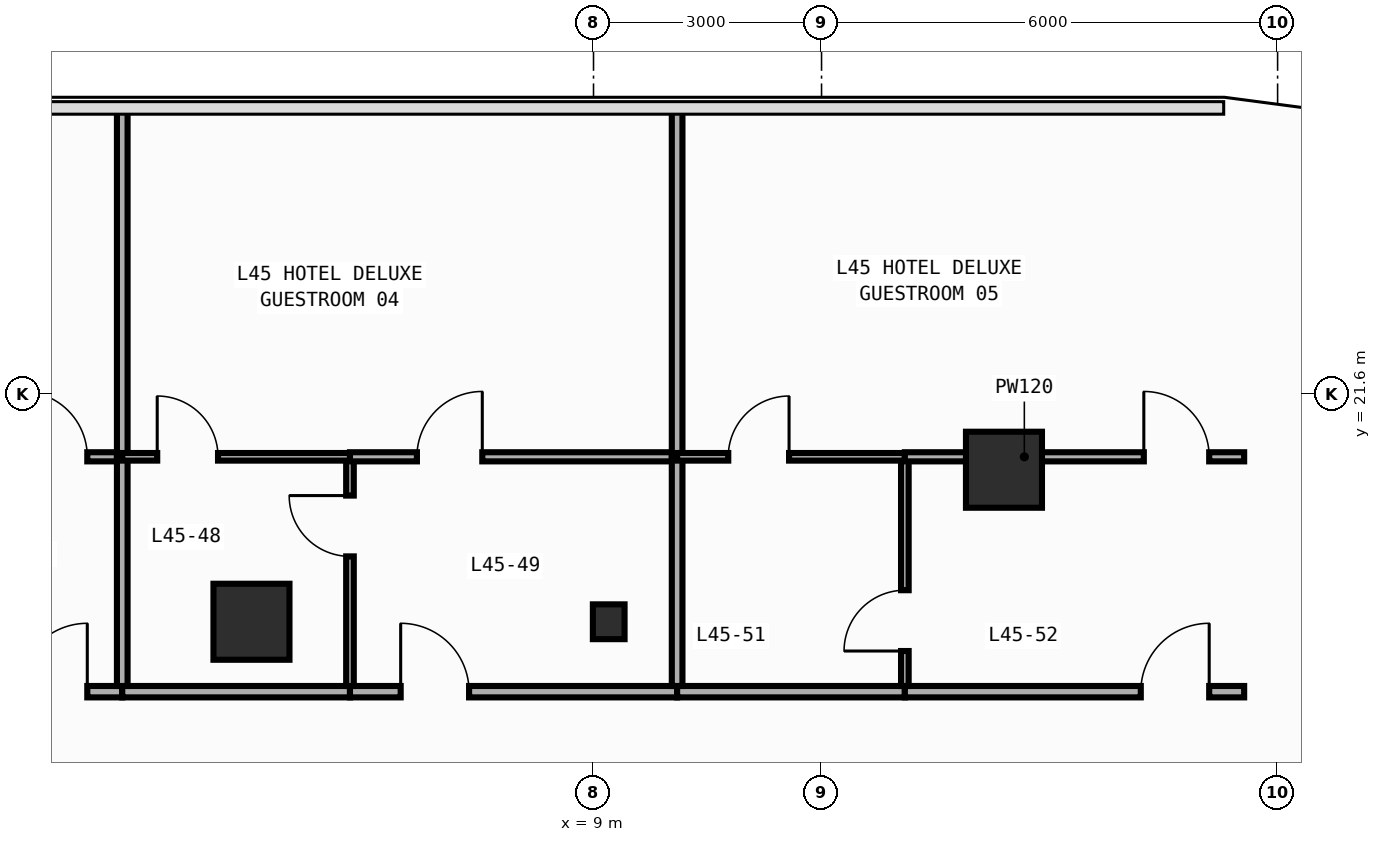
"""IFC4 building model, lengths in metres.
Left out: names, types, materials, properties, quantities, classifications, styles, units other than length and angle.
Written with IfcOpenShell. Run it as: python <this file> out.ifc"""

import sys

from ifc_helpers import new_model, si_unit, direction, frame, frame_2d, origin, origin_2d, place, context, subcontext, project, spatial, rectangle, i_section, extrude, element, fill, save


model = new_model("IFC4")
c1 = context("Model", 3, precision=1e-05, world=origin(), true_north=direction((0.0, 1.0)))
c2 = subcontext(c1, "Body", "Model", "MODEL_VIEW")
j1 = project(units=[si_unit("LENGTHUNIT", "METRE"), si_unit("PLANEANGLEUNIT", "RADIAN")], contexts=[c1])
p1 = place(None, origin())
s1 = spatial("IfcSite", under=j1, at=p1, CompositionType="ELEMENT")
p2 = place(p1, origin())
s2 = spatial("IfcBuilding", under=s1, at=p2, CompositionType="ELEMENT")
p3 = place(p2, frame((0.0, 0.0, 195.4)))
s3 = spatial("IfcBuildingStorey", under=s2, at=p3, CompositionType="ELEMENT", Elevation=195.4)
p4 = place(p3, frame((9.2, 18.6, 0.0), z_axis=(0.0, 0.0, 1.0), x_axis=(1.0, 0.0, 0.0)))
e1 = element("IfcColumn", 1, at=p4, inside=s3, PredefinedType="COLUMN", context=c2, shape_type="SweptSolid", body=[
    extrude(i_section(OverallWidth=0.417, OverallDepth=0.458, WebThickness=0.03, FlangeThickness=0.05, FilletRadius=0.022, at=origin_2d()), origin(), (0.0, 0.0, 1.0), 3.8),
])
for number, where, z_axis, x_axis in (
    (2, (4.5, 18.6, 0.0), (0.0, 0.0, 1.0), (1.0, 0.0, 0.0)),
    (3, (14.4, 20.6, 0.0), (0.0, 0.0, 1.0), (1.0, 0.0, 0.0)),
):
    element("IfcColumn", number, at=place(p3, frame(where, z_axis=z_axis, x_axis=x_axis)), inside=s3, PredefinedType="COLUMN", context=c2, shape_type="SweptSolid", body=[
        extrude(rectangle(XDim=1.0, YDim=1.0, at=origin_2d()), origin(), (0.0, 0.0, 1.0), 3.8),
    ])
p5 = place(p3, frame((-1.444, 17.68, 0.0), z_axis=(0.0, 0.0, 1.0), x_axis=(1.0, 0.0, 0.0)))
e4 = element("IfcWall", 4, at=p5, inside=s3, PredefinedType="PARTITIONING", context=c2, shape_type="SweptSolid", body=[
    extrude(rectangle(XDim=4.244, YDim=0.15, at=frame_2d((2.122, 0.0))), origin(), (0.0, 0.0, 1.0), 3.54),
])
p6 = place(p5, frame((2.884, 0.0, 0.0)))
e5 = element("IfcOpeningElement", 5, at=p6, cuts=e4, PredefinedType="OPENING", context=c2, shape_type="SweptSolid", body=[
    extrude(rectangle(XDim=0.9, YDim=2.15, at=frame_2d((0.45, 1.075))), frame((0.0, 0.085, 0.0), z_axis=(0.0, -1.0, 0.0), x_axis=(1.0, 0.0, 0.0)), (0.0, 0.0, 1.0), 0.17),
])
p7 = place(p3, frame((2.8, 17.68, 0.0), z_axis=(0.0, 0.0, 1.0), x_axis=(1.0, 0.0, 0.0)))
e6 = element("IfcWall", 6, at=p7, inside=s3, PredefinedType="PARTITIONING", context=c2, shape_type="SweptSolid", body=[
    extrude(rectangle(XDim=2.996, YDim=0.15, at=frame_2d((1.498, 0.0))), origin(), (0.0, 0.0, 1.0), 3.54),
])
p8 = place(p3, frame((5.796, 17.68, 0.0), z_axis=(0.0, 0.0, 1.0), x_axis=(1.0, 0.0, 0.0)))
e7 = element("IfcWall", 7, at=p8, inside=s3, PredefinedType="PARTITIONING", context=c2, shape_type="SweptSolid", body=[
    extrude(rectangle(XDim=4.304, YDim=0.15, at=frame_2d((2.152, 0.0))), origin(), (0.0, 0.0, 1.0), 3.54),
])
p9 = place(p8, frame((0.667, 0.0, 0.0)))
e8 = element("IfcOpeningElement", 8, at=p9, cuts=e7, PredefinedType="OPENING", context=c2, shape_type="SweptSolid", body=[
    extrude(rectangle(XDim=0.9, YDim=2.15, at=frame_2d((0.45, 1.075))), frame((0.0, 0.085, 0.0), z_axis=(0.0, -1.0, 0.0), x_axis=(1.0, 0.0, 0.0)), (0.0, 0.0, 1.0), 0.17),
])
p10 = place(p3, frame((10.1, 17.68, 0.0), z_axis=(0.0, 0.0, 1.0), x_axis=(1.0, 0.0, 0.0)))
e9 = element("IfcWall", 9, at=p10, inside=s3, PredefinedType="PARTITIONING", context=c2, shape_type="SweptSolid", body=[
    extrude(rectangle(XDim=2.996, YDim=0.15, at=frame_2d((1.498, 0.0))), origin(), (0.0, 0.0, 1.0), 3.54),
])
p11 = place(p3, frame((13.096, 17.68, 0.0), z_axis=(0.0, 0.0, 1.0), x_axis=(1.0, 0.0, 0.0)))
e10 = element("IfcWall", 10, at=p11, inside=s3, PredefinedType="PARTITIONING", context=c2, shape_type="SweptSolid", body=[
    extrude(rectangle(XDim=4.464, YDim=0.15, at=frame_2d((2.232, 0.0))), origin(), (0.0, 0.0, 1.0), 3.54),
])
p12 = place(p11, frame((3.104, 0.0, 0.0)))
e11 = element("IfcOpeningElement", 11, at=p12, cuts=e10, PredefinedType="OPENING", context=c2, shape_type="SweptSolid", body=[
    extrude(rectangle(XDim=0.9, YDim=2.15, at=frame_2d((0.45, 1.075))), frame((0.0, 0.085, 0.0), z_axis=(0.0, -1.0, 0.0), x_axis=(1.0, 0.0, 0.0)), (0.0, 0.0, 1.0), 0.17),
])
p13 = place(p3, frame((-1.444, 20.77, 0.0), z_axis=(0.0, 0.0, 1.0), x_axis=(1.0, 0.0, 0.0)))
e12 = element("IfcWall", 12, at=p13, inside=s3, PredefinedType="PARTITIONING", context=c2, shape_type="SweptSolid", body=[
    extrude(rectangle(XDim=4.244, YDim=0.12, at=frame_2d((2.122, 0.0))), origin(), (0.0, 0.0, 1.0), 3.54),
])
p14 = place(p13, frame((2.924, 0.0, 0.0)))
e13 = element("IfcOpeningElement", 13, at=p14, cuts=e12, PredefinedType="OPENING", context=c2, shape_type="SweptSolid", body=[
    extrude(rectangle(XDim=0.86, YDim=2.15, at=frame_2d((0.43, 1.075))), frame((0.0, 0.07, 0.0), z_axis=(0.0, -1.0, 0.0), x_axis=(1.0, 0.0, 0.0)), (0.0, 0.0, 1.0), 0.14),
])
p15 = place(p3, frame((2.8, 17.755, 0.0), z_axis=(0.0, 0.0, 1.0), x_axis=(0.0, 1.0, 0.0)))
e14 = element("IfcWall", 14, at=p15, inside=s3, PredefinedType="PARTITIONING", context=c2, shape_type="SweptSolid", body=[
    extrude(rectangle(XDim=3.015, YDim=0.14, at=frame_2d((1.508, 0.0))), origin(), (0.0, 0.0, 1.0), 3.54),
])
p16 = place(p3, frame((2.8, 20.77, 0.0), z_axis=(0.0, 0.0, 1.0), x_axis=(0.0, 1.0, 0.0)))
e15 = element("IfcWall", 15, at=p16, inside=s3, PredefinedType="PARTITIONING", context=c2, shape_type="SweptSolid", body=[
    extrude(rectangle(XDim=4.585, YDim=0.14, at=frame_2d((2.292, 0.0))), origin(), (0.0, 0.0, 1.0), 3.54),
])
p17 = place(p3, frame((5.796, 17.755, 0.0), z_axis=(0.0, 0.0, 1.0), x_axis=(0.0, 1.0, 0.0)))
e16 = element("IfcWall", 16, at=p17, inside=s3, PredefinedType="PARTITIONING", context=c2, shape_type="SweptSolid", body=[
    extrude(rectangle(XDim=2.965, YDim=0.1, at=frame_2d((1.482, 0.0))), origin(), (0.0, 0.0, 1.0), 3.54),
])
p18 = place(p17, frame((1.705, 0.0, 0.0)))
e17 = element("IfcOpeningElement", 17, at=p18, cuts=e16, PredefinedType="OPENING", context=c2, shape_type="SweptSolid", body=[
    extrude(rectangle(XDim=0.8, YDim=2.1, at=frame_2d((0.4, 1.05))), frame((0.0, 0.06, 0.0), z_axis=(0.0, -1.0, 0.0), x_axis=(1.0, 0.0, 0.0)), (0.0, 0.0, 1.0), 0.12),
])
p19 = place(p3, frame((2.8, 20.77, 0.0), z_axis=(0.0, 0.0, 1.0), x_axis=(1.0, 0.0, 0.0)))
e18 = element("IfcWall", 18, at=p19, inside=s3, PredefinedType="PARTITIONING", context=c2, shape_type="SweptSolid", body=[
    extrude(rectangle(XDim=2.996, YDim=0.1, at=frame_2d((1.498, 0.0))), origin(), (0.0, 0.0, 1.0), 3.54),
])
p20 = place(p19, frame((0.46, 0.0, 0.0)))
e19 = element("IfcOpeningElement", 19, at=p20, cuts=e18, PredefinedType="OPENING", context=c2, shape_type="SweptSolid", body=[
    extrude(rectangle(XDim=0.8, YDim=2.1, at=frame_2d((0.4, 1.05))), frame((0.0, 0.06, 0.0), z_axis=(0.0, -1.0, 0.0), x_axis=(1.0, 0.0, 0.0)), (0.0, 0.0, 1.0), 0.12),
])
p21 = place(p3, frame((5.796, 20.77, 0.0), z_axis=(0.0, 0.0, 1.0), x_axis=(1.0, 0.0, 0.0)))
e20 = element("IfcWall", 20, at=p21, inside=s3, PredefinedType="PARTITIONING", context=c2, shape_type="SweptSolid", body=[
    extrude(rectangle(XDim=4.304, YDim=0.12, at=frame_2d((2.152, 0.0))), origin(), (0.0, 0.0, 1.0), 3.54),
])
p22 = place(p21, frame((0.881, 0.0, 0.0)))
e21 = element("IfcOpeningElement", 21, at=p22, cuts=e20, PredefinedType="OPENING", context=c2, shape_type="SweptSolid", body=[
    extrude(rectangle(XDim=0.86, YDim=2.15, at=frame_2d((0.43, 1.075))), frame((0.0, 0.07, 0.0), z_axis=(0.0, -1.0, 0.0), x_axis=(1.0, 0.0, 0.0)), (0.0, 0.0, 1.0), 0.14),
])
p23 = place(p3, frame((10.1, 17.755, 0.0), z_axis=(0.0, 0.0, 1.0), x_axis=(0.0, 1.0, 0.0)))
e22 = element("IfcWall", 22, at=p23, inside=s3, PredefinedType="PARTITIONING", context=c2, shape_type="SweptSolid", body=[
    extrude(rectangle(XDim=3.015, YDim=0.14, at=frame_2d((1.508, 0.0))), origin(), (0.0, 0.0, 1.0), 3.54),
])
p24 = place(p3, frame((10.1, 20.77, 0.0), z_axis=(0.0, 0.0, 1.0), x_axis=(0.0, 1.0, 0.0)))
e23 = element("IfcWall", 23, at=p24, inside=s3, PredefinedType="PARTITIONING", context=c2, shape_type="SweptSolid", body=[
    extrude(rectangle(XDim=4.585, YDim=0.14, at=frame_2d((2.292, 0.0))), origin(), (0.0, 0.0, 1.0), 3.54),
])
p25 = place(p3, frame((13.096, 17.755, 0.0), z_axis=(0.0, 0.0, 1.0), x_axis=(0.0, 1.0, 0.0)))
e24 = element("IfcWall", 24, at=p25, inside=s3, PredefinedType="PARTITIONING", context=c2, shape_type="SweptSolid", body=[
    extrude(rectangle(XDim=2.965, YDim=0.1, at=frame_2d((1.482, 0.0))), origin(), (0.0, 0.0, 1.0), 3.54),
])
p26 = place(p25, frame((0.46, 0.0, 0.0)))
e25 = element("IfcOpeningElement", 25, at=p26, cuts=e24, PredefinedType="OPENING", context=c2, shape_type="SweptSolid", body=[
    extrude(rectangle(XDim=0.8, YDim=2.1, at=frame_2d((0.4, 1.05))), frame((0.0, 0.06, 0.0), z_axis=(0.0, -1.0, 0.0), x_axis=(1.0, 0.0, 0.0)), (0.0, 0.0, 1.0), 0.12),
])
p27 = place(p3, frame((10.1, 20.77, 0.0), z_axis=(0.0, 0.0, 1.0), x_axis=(1.0, 0.0, 0.0)))
e26 = element("IfcWall", 26, at=p27, inside=s3, PredefinedType="PARTITIONING", context=c2, shape_type="SweptSolid", body=[
    extrude(rectangle(XDim=2.996, YDim=0.1, at=frame_2d((1.498, 0.0))), origin(), (0.0, 0.0, 1.0), 3.54),
])
p28 = place(p27, frame((0.673, 0.0, 0.0)))
e27 = element("IfcOpeningElement", 27, at=p28, cuts=e26, PredefinedType="OPENING", context=c2, shape_type="SweptSolid", body=[
    extrude(rectangle(XDim=0.8, YDim=2.1, at=frame_2d((0.4, 1.05))), frame((0.0, 0.06, 0.0), z_axis=(0.0, -1.0, 0.0), x_axis=(1.0, 0.0, 0.0)), (0.0, 0.0, 1.0), 0.12),
])
p29 = place(p3, frame((13.096, 20.77, 0.0), z_axis=(0.0, 0.0, 1.0), x_axis=(1.0, 0.0, 0.0)))
e28 = element("IfcWall", 28, at=p29, inside=s3, PredefinedType="PARTITIONING", context=c2, shape_type="SweptSolid", body=[
    extrude(rectangle(XDim=4.464, YDim=0.12, at=frame_2d((2.232, 0.0))), origin(), (0.0, 0.0, 1.0), 3.54),
])
p30 = place(p29, frame((3.144, 0.0, 0.0)))
e29 = element("IfcOpeningElement", 29, at=p30, cuts=e28, PredefinedType="OPENING", context=c2, shape_type="SweptSolid", body=[
    extrude(rectangle(XDim=0.86, YDim=2.15, at=frame_2d((0.43, 1.075))), frame((0.0, 0.07, 0.0), z_axis=(0.0, -1.0, 0.0), x_axis=(1.0, 0.0, 0.0)), (0.0, 0.0, 1.0), 0.14),
])
p31 = place(p6, origin())
e30 = element("IfcDoor", 30, at=p31, inside=s3, OperationType="SINGLE_SWING_RIGHT", PredefinedType="DOOR", context=c2, shape_type="SweptSolid", body=[
    extrude(rectangle(XDim=0.9, YDim=2.15, at=frame_2d((0.45, 1.075))), frame((0.0, 0.025, 0.0), z_axis=(0.0, -1.0, 0.0), x_axis=(1.0, 0.0, 0.0)), (0.0, 0.0, 1.0), 0.05),
])
fill(e5, e30)
p32 = place(p9, origin())
e31 = element("IfcDoor", 31, at=p32, inside=s3, OperationType="SINGLE_SWING_LEFT", PredefinedType="DOOR", context=c2, shape_type="SweptSolid", body=[
    extrude(rectangle(XDim=0.9, YDim=2.15, at=frame_2d((0.45, 1.075))), frame((0.0, 0.025, 0.0), z_axis=(0.0, -1.0, 0.0), x_axis=(1.0, 0.0, 0.0)), (0.0, 0.0, 1.0), 0.05),
])
fill(e8, e31)
p33 = place(p12, origin())
e32 = element("IfcDoor", 32, at=p33, inside=s3, OperationType="SINGLE_SWING_RIGHT", PredefinedType="DOOR", context=c2, shape_type="SweptSolid", body=[
    extrude(rectangle(XDim=0.9, YDim=2.15, at=frame_2d((0.45, 1.075))), frame((0.0, 0.025, 0.0), z_axis=(0.0, -1.0, 0.0), x_axis=(1.0, 0.0, 0.0)), (0.0, 0.0, 1.0), 0.05),
])
fill(e11, e32)
p34 = place(p14, origin())
e33 = element("IfcDoor", 33, at=p34, inside=s3, OperationType="SINGLE_SWING_LEFT", PredefinedType="DOOR", context=c2, shape_type="SweptSolid", body=[
    extrude(rectangle(XDim=0.86, YDim=2.15, at=frame_2d((0.43, 1.075))), frame((0.0, 0.025, 0.0), z_axis=(0.0, -1.0, 0.0), x_axis=(1.0, 0.0, 0.0)), (0.0, 0.0, 1.0), 0.05),
])
fill(e13, e33)
p35 = place(p18, origin())
e34 = element("IfcDoor", 34, at=p35, inside=s3, OperationType="SINGLE_SWING_RIGHT", PredefinedType="DOOR", context=c2, shape_type="SweptSolid", body=[
    extrude(rectangle(XDim=0.8, YDim=2.1, at=frame_2d((0.4, 1.05))), frame((0.0, 0.025, 0.0), z_axis=(0.0, -1.0, 0.0), x_axis=(1.0, 0.0, 0.0)), (0.0, 0.0, 1.0), 0.05),
])
fill(e17, e34)
p36 = place(p20, origin())
e35 = element("IfcDoor", 35, at=p36, inside=s3, OperationType="SINGLE_SWING_LEFT", PredefinedType="DOOR", context=c2, shape_type="SweptSolid", body=[
    extrude(rectangle(XDim=0.8, YDim=2.1, at=frame_2d((0.4, 1.05))), frame((0.0, 0.025, 0.0), z_axis=(0.0, -1.0, 0.0), x_axis=(1.0, 0.0, 0.0)), (0.0, 0.0, 1.0), 0.05),
])
fill(e19, e35)
p37 = place(p22, origin())
e36 = element("IfcDoor", 36, at=p37, inside=s3, OperationType="SINGLE_SWING_RIGHT", PredefinedType="DOOR", context=c2, shape_type="SweptSolid", body=[
    extrude(rectangle(XDim=0.86, YDim=2.15, at=frame_2d((0.43, 1.075))), frame((0.0, 0.025, 0.0), z_axis=(0.0, -1.0, 0.0), x_axis=(1.0, 0.0, 0.0)), (0.0, 0.0, 1.0), 0.05),
])
fill(e21, e36)
p38 = place(p26, origin())
e37 = element("IfcDoor", 37, at=p38, inside=s3, OperationType="SINGLE_SWING_LEFT", PredefinedType="DOOR", context=c2, shape_type="SweptSolid", body=[
    extrude(rectangle(XDim=0.8, YDim=2.1, at=frame_2d((0.4, 1.05))), frame((0.0, 0.025, 0.0), z_axis=(0.0, -1.0, 0.0), x_axis=(1.0, 0.0, 0.0)), (0.0, 0.0, 1.0), 0.05),
])
fill(e25, e37)
p39 = place(p28, origin())
e38 = element("IfcDoor", 38, at=p39, inside=s3, OperationType="SINGLE_SWING_RIGHT", PredefinedType="DOOR", context=c2, shape_type="SweptSolid", body=[
    extrude(rectangle(XDim=0.8, YDim=2.1, at=frame_2d((0.4, 1.05))), frame((0.0, 0.025, 0.0), z_axis=(0.0, -1.0, 0.0), x_axis=(1.0, 0.0, 0.0)), (0.0, 0.0, 1.0), 0.05),
])
fill(e27, e38)
p40 = place(p30, origin())
e39 = element("IfcDoor", 39, at=p40, inside=s3, OperationType="SINGLE_SWING_LEFT", PredefinedType="DOOR", context=c2, shape_type="SweptSolid", body=[
    extrude(rectangle(XDim=0.86, YDim=2.15, at=frame_2d((0.43, 1.075))), frame((0.0, 0.025, 0.0), z_axis=(0.0, -1.0, 0.0), x_axis=(1.0, 0.0, 0.0)), (0.0, 0.0, 1.0), 0.05),
])
fill(e29, e39)
save(model, sys.argv[1])
